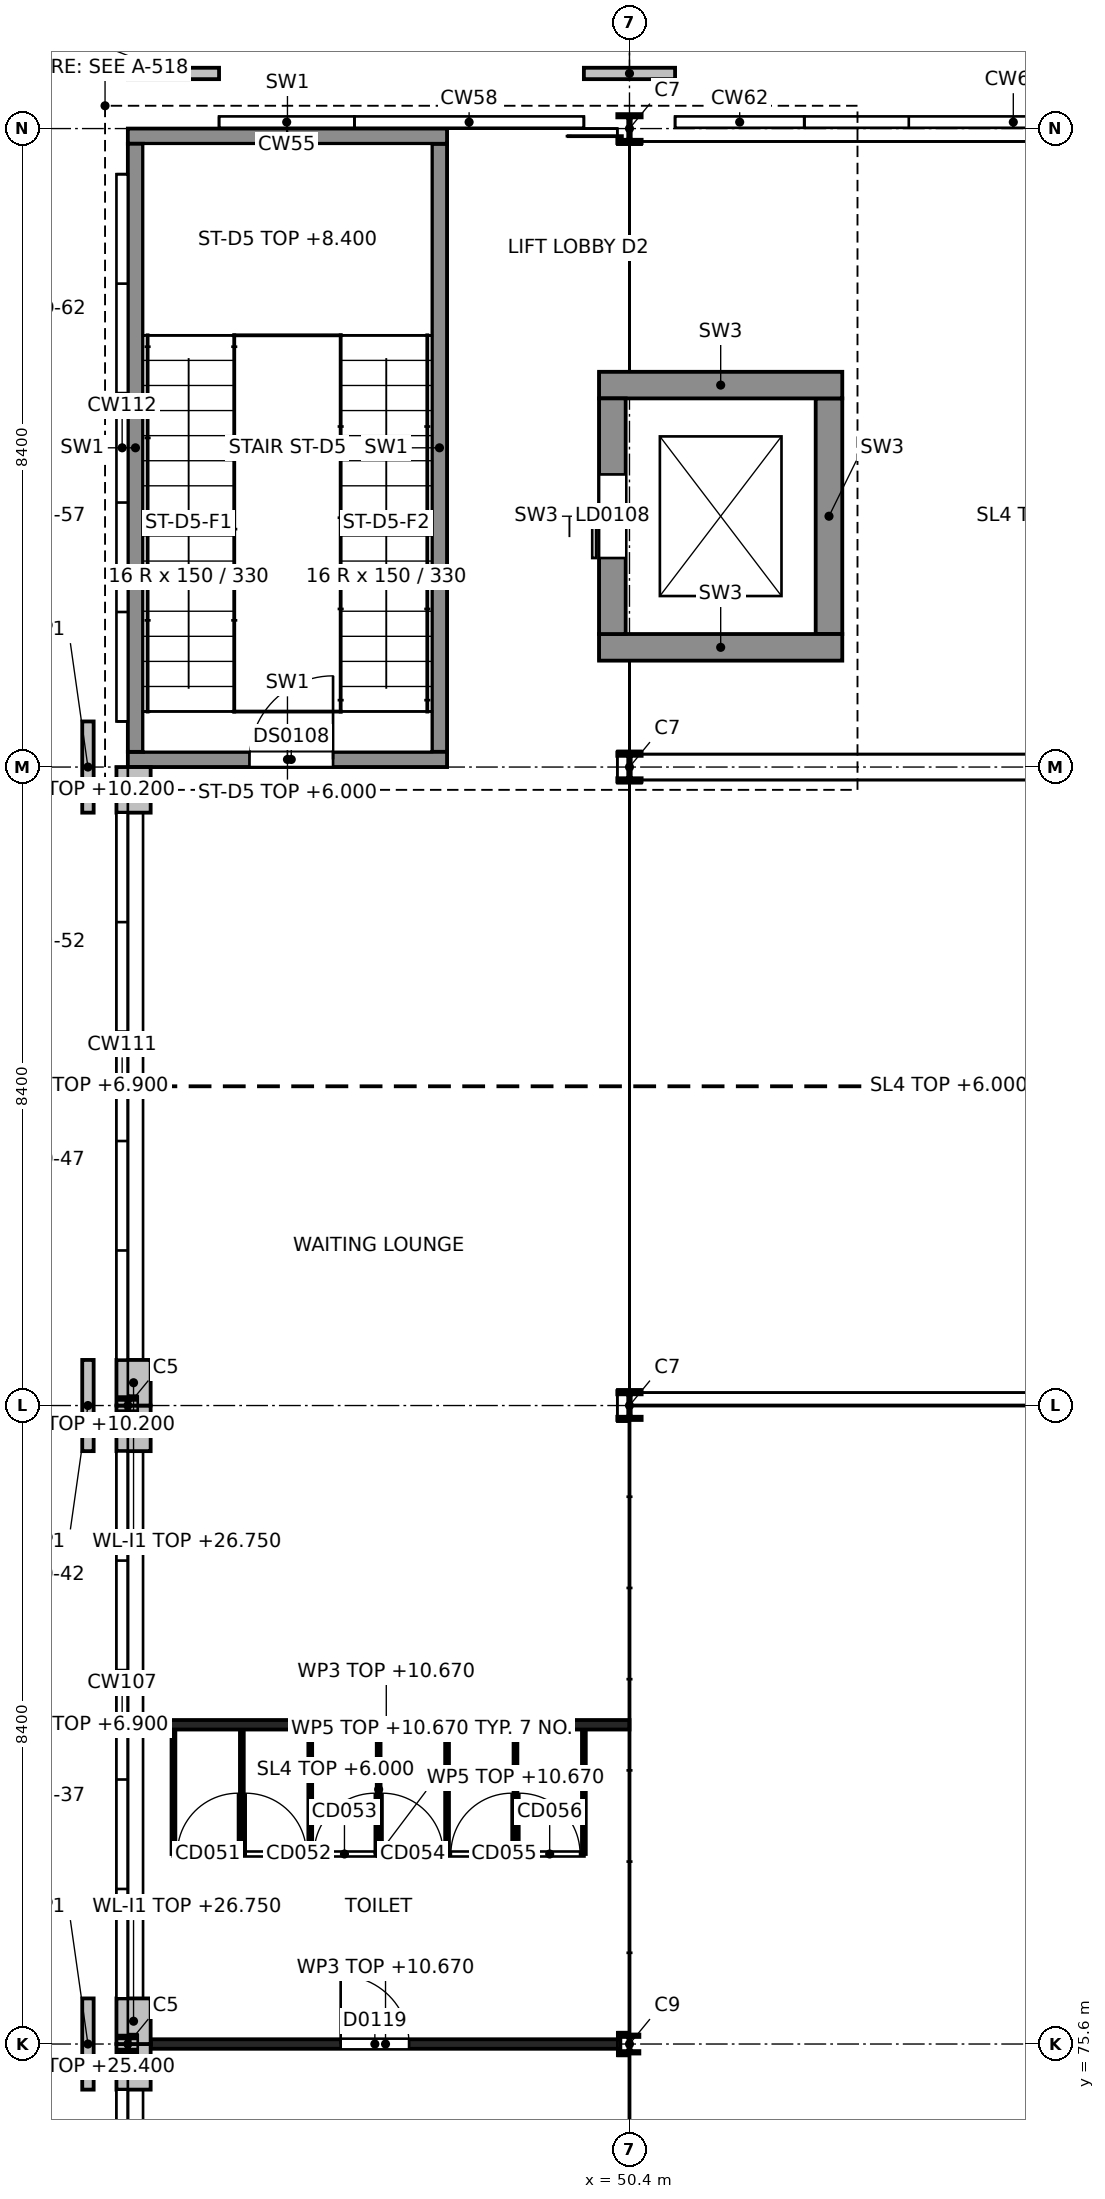
"""IFC4 building model, lengths in metres.
Left out: names, types, materials, properties, quantities, classifications, styles, units other than length and angle.
Written with IfcOpenShell. Run it as: python <this file> out.ifc"""

import sys

from ifc_helpers import new_model, si_unit, direction, frame, frame_2d, origin, origin_2d, place, context, subcontext, project, spatial, rectangle, i_section, extrude, element, fill, save


model = new_model("IFC4")
c1 = context("Model", 3, precision=1e-05, world=origin(), true_north=direction((0.0, 1.0)))
c2 = subcontext(c1, "Body", "Model", "MODEL_VIEW")
j1 = project(units=[si_unit("LENGTHUNIT", "METRE"), si_unit("PLANEANGLEUNIT", "RADIAN")], contexts=[c1])
p1 = place(None, origin())
s1 = spatial("IfcSite", under=j1, at=p1, CompositionType="ELEMENT")
p2 = place(p1, origin())
s2 = spatial("IfcBuilding", under=s1, at=p2, CompositionType="ELEMENT")
p3 = place(p2, frame((0.0, 0.0, 6.0)))
s3 = spatial("IfcBuildingStorey", under=s2, at=p3, CompositionType="ELEMENT", Elevation=6.0)
for number, where, z_axis, x_axis in (
    (1, (43.8, 75.6, 0.0), (0.0, 0.0, 1.0), (1.0, 0.0, 0.0)),
    (2, (43.8, 84.0, 0.0), (0.0, 0.0, 1.0), (1.0, 0.0, 0.0)),
):
    element("IfcColumn", number, at=place(p3, frame(where, z_axis=z_axis, x_axis=x_axis)), inside=s3, PredefinedType="COLUMN", context=c2, shape_type="SweptSolid", body=[
        extrude(i_section(OverallWidth=0.2, OverallDepth=0.2, WebThickness=0.009, FlangeThickness=0.015, at=origin_2d()), origin(), (0.0, 0.0, 1.0), 4.8),
    ])
p4 = place(p3, frame((50.4, 75.6, 0.0), z_axis=(0.0, 0.0, 1.0), x_axis=(1.0, 0.0, 0.0)))
e3 = element("IfcColumn", 3, at=p4, inside=s3, PredefinedType="COLUMN", context=c2, shape_type="SweptSolid", body=[
    extrude(i_section(OverallWidth=0.24, OverallDepth=0.23, WebThickness=0.008, FlangeThickness=0.012, at=origin_2d()), origin(), (0.0, 0.0, 1.0), 4.8),
])
for number, where, z_axis, x_axis in (
    (4, (50.4, 84.0, 0.0), (0.0, 0.0, 1.0), (1.0, 0.0, 0.0)),
    (5, (50.4, 92.4, 0.0), (0.0, 0.0, 1.0), (1.0, 0.0, 0.0)),
    (6, (50.4, 100.8, 0.0), (0.0, 0.0, 1.0), (1.0, 0.0, 0.0)),
):
    element("IfcColumn", number, at=place(p3, frame(where, z_axis=z_axis, x_axis=x_axis)), inside=s3, PredefinedType="COLUMN", context=c2, shape_type="SweptSolid", body=[
        extrude(i_section(OverallWidth=0.3, OverallDepth=0.36, WebThickness=0.012, FlangeThickness=0.022, at=origin_2d()), origin(), (0.0, 0.0, 1.0), 4.8),
    ])
p5 = place(p3, frame((43.8, 92.5, 0.0), z_axis=(0.0, 0.0, 1.0), x_axis=(1.0, 0.0, 0.0)))
e7 = element("IfcWall", 7, at=p5, inside=s3, PredefinedType="SHEAR", context=c2, shape_type="SweptSolid", body=[
    extrude(rectangle(XDim=4.2, YDim=0.2, at=frame_2d((2.1, 0.0))), origin(), (0.0, 0.0, 1.0), 4.8),
])
p6 = place(p5, frame((1.6, 0.0, 0.0)))
e8 = element("IfcOpeningElement", 8, at=p6, cuts=e7, PredefinedType="OPENING", context=c2, shape_type="SweptSolid", body=[
    extrude(rectangle(XDim=1.1, YDim=2.1, at=frame_2d((0.55, 1.05))), frame((0.0, 0.1, 0.0), z_axis=(0.0, -1.0, 0.0), x_axis=(1.0, 0.0, 0.0)), (0.0, 0.0, 1.0), 0.2),
])
p7 = place(p3, frame((43.8, 100.7, 0.0), z_axis=(0.0, 0.0, 1.0), x_axis=(1.0, 0.0, 0.0)))
e9 = element("IfcWall", 9, at=p7, inside=s3, PredefinedType="SHEAR", context=c2, shape_type="SweptSolid", body=[
    extrude(rectangle(XDim=4.2, YDim=0.2, at=frame_2d((2.1, 0.0))), origin(), (0.0, 0.0, 1.0), 4.8),
])
for number, where, z_axis, x_axis in (
    (10, (43.9, 92.6, 0.0), (0.0, 0.0, 1.0), (0.0, 1.0, 0.0)),
    (11, (47.9, 92.6, 0.0), (0.0, 0.0, 1.0), (0.0, 1.0, 0.0)),
):
    element("IfcWall", number, at=place(p3, frame(where, z_axis=z_axis, x_axis=x_axis)), inside=s3, PredefinedType="SHEAR", context=c2, shape_type="SweptSolid", body=[
        extrude(rectangle(XDim=8.0, YDim=0.2, at=frame_2d((4.0, 0.0))), origin(), (0.0, 0.0, 1.0), 4.8),
    ])
for number, where, z_axis, x_axis in (
    (12, (50.0, 93.975, 0.0), (0.0, 0.0, 1.0), (1.0, 0.0, 0.0)),
    (13, (50.0, 97.425, 0.0), (0.0, 0.0, 1.0), (1.0, 0.0, 0.0)),
):
    element("IfcWall", number, at=place(p3, frame(where, z_axis=z_axis, x_axis=x_axis)), inside=s3, PredefinedType="SHEAR", context=c2, shape_type="SweptSolid", body=[
        extrude(rectangle(XDim=3.2, YDim=0.35, at=frame_2d((1.6, 0.0))), origin(), (0.0, 0.0, 1.0), 4.8),
    ])
p8 = place(p3, frame((50.175, 94.15, 0.0), z_axis=(0.0, 0.0, 1.0), x_axis=(0.0, 1.0, 0.0)))
e14 = element("IfcWall", 14, at=p8, inside=s3, PredefinedType="SHEAR", context=c2, shape_type="SweptSolid", body=[
    extrude(rectangle(XDim=3.1, YDim=0.35, at=frame_2d((1.55, 0.0))), origin(), (0.0, 0.0, 1.0), 4.8),
])
p9 = place(p8, frame((1.0, 0.0, 0.0)))
e15 = element("IfcOpeningElement", 15, at=p9, cuts=e14, PredefinedType="OPENING", context=c2, shape_type="SweptSolid", body=[
    extrude(rectangle(XDim=1.1, YDim=2.1, at=frame_2d((0.55, 1.05))), frame((0.0, 0.175, 0.0), z_axis=(0.0, -1.0, 0.0), x_axis=(1.0, 0.0, 0.0)), (0.0, 0.0, 1.0), 0.35),
])
p10 = place(p3, frame((53.025, 94.15, 0.0), z_axis=(0.0, 0.0, 1.0), x_axis=(0.0, 1.0, 0.0)))
e16 = element("IfcWall", 16, at=p10, inside=s3, PredefinedType="SHEAR", context=c2, shape_type="SweptSolid", body=[
    extrude(rectangle(XDim=3.1, YDim=0.35, at=frame_2d((1.55, 0.0))), origin(), (0.0, 0.0, 1.0), 4.8),
])
p11 = place(p3, frame((43.825, 67.8, 0.0), z_axis=(0.0, 0.0, 1.0), x_axis=(0.0, 1.0, 0.0)))
e17 = element("IfcWall", 17, at=p11, inside=s3, PredefinedType="SOLIDWALL", context=c2, shape_type="SweptSolid", body=[
    extrude(rectangle(XDim=7.2, YDim=0.35, at=frame_2d((3.6, 0.0))), origin(), (0.0, 0.0, 1.0), 0.9),
])
p12 = place(p3, frame((43.875, 75.0, 0.0), z_axis=(0.0, 0.0, 1.0), x_axis=(0.0, 1.0, 0.0)))
e18 = element("IfcWall", 18, at=p12, inside=s3, PredefinedType="SOLIDWALL", context=c2, shape_type="SweptSolid", body=[
    extrude(rectangle(XDim=0.6, YDim=0.45, at=frame_2d((0.3, 0.0))), origin(), (0.0, 0.0, 1.0), 19.4),
])
p13 = place(p3, frame((43.825, 76.2, 0.0), z_axis=(0.0, 0.0, 1.0), x_axis=(0.0, 1.0, 0.0)))
e19 = element("IfcWall", 19, at=p13, inside=s3, PredefinedType="SOLIDWALL", context=c2, shape_type="SweptSolid", body=[
    extrude(rectangle(XDim=7.2, YDim=0.35, at=frame_2d((3.6, 0.0))), origin(), (0.0, 0.0, 1.0), 0.9),
])
p14 = place(p3, frame((43.875, 75.6, 0.0), z_axis=(0.0, 0.0, 1.0), x_axis=(0.0, 1.0, 0.0)))
e20 = element("IfcWall", 20, at=p14, inside=s3, PredefinedType="SOLIDWALL", context=c2, shape_type="SweptSolid", body=[
    extrude(rectangle(XDim=0.6, YDim=0.45, at=frame_2d((0.3, 0.0))), origin(), (0.0, 0.0, 1.0), 20.75),
])
p15 = place(p3, frame((43.875, 83.4, 0.0), z_axis=(0.0, 0.0, 1.0), x_axis=(0.0, 1.0, 0.0)))
e21 = element("IfcWall", 21, at=p15, inside=s3, PredefinedType="SOLIDWALL", context=c2, shape_type="SweptSolid", body=[
    extrude(rectangle(XDim=0.6, YDim=0.45, at=frame_2d((0.3, 0.0))), origin(), (0.0, 0.0, 1.0), 20.75),
])
p16 = place(p3, frame((43.825, 84.6, 0.0), z_axis=(0.0, 0.0, 1.0), x_axis=(0.0, 1.0, 0.0)))
e22 = element("IfcWall", 22, at=p16, inside=s3, PredefinedType="SOLIDWALL", context=c2, shape_type="SweptSolid", body=[
    extrude(rectangle(XDim=7.2, YDim=0.35, at=frame_2d((3.6, 0.0))), origin(), (0.0, 0.0, 1.0), 0.9),
])
p17 = place(p3, frame((43.875, 84.0, 0.0), z_axis=(0.0, 0.0, 1.0), x_axis=(0.0, 1.0, 0.0)))
e23 = element("IfcWall", 23, at=p17, inside=s3, PredefinedType="SOLIDWALL", context=c2, shape_type="SweptSolid", body=[
    extrude(rectangle(XDim=0.6, YDim=0.45, at=frame_2d((0.3, 0.0))), origin(), (0.0, 0.0, 1.0), 4.2),
])
p18 = place(p3, frame((43.875, 91.8, 0.0), z_axis=(0.0, 0.0, 1.0), x_axis=(0.0, 1.0, 0.0)))
e24 = element("IfcWall", 24, at=p18, inside=s3, PredefinedType="SOLIDWALL", context=c2, shape_type="SweptSolid", body=[
    extrude(rectangle(XDim=0.6, YDim=0.45, at=frame_2d((0.3, 0.0))), origin(), (0.0, 0.0, 1.0), 4.2),
])
p19 = place(p3, frame((43.275, 75.0, 0.0), z_axis=(0.0, 0.0, 1.0), x_axis=(0.0, 1.0, 0.0)))
e25 = element("IfcWall", 25, at=p19, inside=s3, PredefinedType="SOLIDWALL", context=c2, shape_type="SweptSolid", body=[
    extrude(rectangle(XDim=1.2, YDim=0.15, at=frame_2d((0.6, 0.0))), origin(), (0.0, 0.0, 1.0), 4.8),
])
p20 = place(p3, frame((43.275, 83.4, 0.0), z_axis=(0.0, 0.0, 1.0), x_axis=(0.0, 1.0, 0.0)))
e26 = element("IfcWall", 26, at=p20, inside=s3, PredefinedType="SOLIDWALL", context=c2, shape_type="SweptSolid", body=[
    extrude(rectangle(XDim=1.2, YDim=0.15, at=frame_2d((0.6, 0.0))), origin(), (0.0, 0.0, 1.0), 4.8),
])
for number, where, z_axis, x_axis in (
    (27, (43.275, 91.8, 0.0), (0.0, 0.0, 1.0), (0.0, 1.0, 0.0)),
    (28, (43.8, 101.525, 0.0), (0.0, 0.0, 1.0), (1.0, 0.0, 0.0)),
    (29, (49.8, 101.525, 0.0), (0.0, 0.0, 1.0), (1.0, 0.0, 0.0)),
):
    element("IfcWall", number, at=place(p3, frame(where, z_axis=z_axis, x_axis=x_axis)), inside=s3, PredefinedType="SOLIDWALL", context=c2, shape_type="SweptSolid", body=[
        extrude(rectangle(XDim=1.2, YDim=0.15, at=frame_2d((0.6, 0.0))), origin(), (0.0, 0.0, 1.0), 4.8),
    ])
p21 = place(p3, frame((44.101, 75.6, 0.0), z_axis=(0.0, 0.0, 1.0), x_axis=(1.0, 0.0, 0.0)))
e30 = element("IfcWall", 30, at=p21, inside=s3, PredefinedType="PARTITIONING", context=c2, shape_type="SweptSolid", body=[
    extrude(rectangle(XDim=6.179, YDim=0.125, at=frame_2d((3.09, 0.0))), origin(), (0.0, 0.0, 1.0), 4.67),
])
p22 = place(p21, frame((2.5, 0.0, 0.0)))
e31 = element("IfcOpeningElement", 31, at=p22, cuts=e30, PredefinedType="OPENING", context=c2, shape_type="SweptSolid", body=[
    extrude(rectangle(XDim=0.9, YDim=2.1, at=frame_2d((0.45, 1.05))), frame((0.0, 0.062, 0.0), z_axis=(0.0, -1.0, 0.0), x_axis=(1.0, 0.0, 0.0)), (0.0, 0.0, 1.0), 0.125),
])
p23 = place(p3, frame((44.0, 79.8, 0.0), z_axis=(0.0, 0.0, 1.0), x_axis=(1.0, 0.0, 0.0)))
e32 = element("IfcWall", 32, at=p23, inside=s3, PredefinedType="PARTITIONING", context=c2, shape_type="SweptSolid", body=[
    extrude(rectangle(XDim=6.399, YDim=0.125, at=frame_2d((3.2, 0.0))), origin(), (0.0, 0.0, 1.0), 4.67),
])
p24 = place(p3, frame((44.4, 78.1, 0.0), z_axis=(0.0, 0.0, 1.0), x_axis=(1.0, 0.0, 0.0)))
e33 = element("IfcWall", 33, at=p24, inside=s3, PredefinedType="PARTITIONING", context=c2, shape_type="SweptSolid", body=[
    extrude(rectangle(XDim=5.4, YDim=0.05, at=frame_2d((2.7, 0.0))), origin(), (0.0, 0.0, 1.0), 4.67),
])
p25 = place(p24, frame((0.05, 0.0, 0.0)))
e34 = element("IfcOpeningElement", 34, at=p25, cuts=e33, PredefinedType="OPENING", context=c2, shape_type="SweptSolid", body=[
    extrude(rectangle(XDim=0.8, YDim=2.0, at=frame_2d((0.4, 1.0))), frame((0.0, 0.025, 0.0), z_axis=(0.0, -1.0, 0.0), x_axis=(1.0, 0.0, 0.0)), (0.0, 0.0, 1.0), 0.05),
])
p26 = place(p24, frame((0.95, 0.0, 0.0)))
e35 = element("IfcOpeningElement", 35, at=p26, cuts=e33, PredefinedType="OPENING", context=c2, shape_type="SweptSolid", body=[
    extrude(rectangle(XDim=0.8, YDim=2.0, at=frame_2d((0.4, 1.0))), frame((0.0, 0.025, 0.0), z_axis=(0.0, -1.0, 0.0), x_axis=(1.0, 0.0, 0.0)), (0.0, 0.0, 1.0), 0.05),
])
p27 = place(p24, frame((1.85, 0.0, 0.0)))
e36 = element("IfcOpeningElement", 36, at=p27, cuts=e33, PredefinedType="OPENING", context=c2, shape_type="SweptSolid", body=[
    extrude(rectangle(XDim=0.8, YDim=2.0, at=frame_2d((0.4, 1.0))), frame((0.0, 0.025, 0.0), z_axis=(0.0, -1.0, 0.0), x_axis=(1.0, 0.0, 0.0)), (0.0, 0.0, 1.0), 0.05),
])
p28 = place(p24, frame((2.75, 0.0, 0.0)))
e37 = element("IfcOpeningElement", 37, at=p28, cuts=e33, PredefinedType="OPENING", context=c2, shape_type="SweptSolid", body=[
    extrude(rectangle(XDim=0.8, YDim=2.0, at=frame_2d((0.4, 1.0))), frame((0.0, 0.025, 0.0), z_axis=(0.0, -1.0, 0.0), x_axis=(1.0, 0.0, 0.0)), (0.0, 0.0, 1.0), 0.05),
])
p29 = place(p24, frame((3.65, 0.0, 0.0)))
e38 = element("IfcOpeningElement", 38, at=p29, cuts=e33, PredefinedType="OPENING", context=c2, shape_type="SweptSolid", body=[
    extrude(rectangle(XDim=0.8, YDim=2.0, at=frame_2d((0.4, 1.0))), frame((0.0, 0.025, 0.0), z_axis=(0.0, -1.0, 0.0), x_axis=(1.0, 0.0, 0.0)), (0.0, 0.0, 1.0), 0.05),
])
p30 = place(p24, frame((4.55, 0.0, 0.0)))
e39 = element("IfcOpeningElement", 39, at=p30, cuts=e33, PredefinedType="OPENING", context=c2, shape_type="SweptSolid", body=[
    extrude(rectangle(XDim=0.8, YDim=2.0, at=frame_2d((0.4, 1.0))), frame((0.0, 0.025, 0.0), z_axis=(0.0, -1.0, 0.0), x_axis=(1.0, 0.0, 0.0)), (0.0, 0.0, 1.0), 0.05),
])
for number, where, z_axis, x_axis in (
    (40, (44.4, 79.8, 0.0), (0.0, 0.0, 1.0), (0.0, -1.0, 0.0)),
    (41, (45.3, 79.8, 0.0), (0.0, 0.0, 1.0), (0.0, -1.0, 0.0)),
    (42, (46.2, 79.8, 0.0), (0.0, 0.0, 1.0), (0.0, -1.0, 0.0)),
    (43, (47.1, 79.8, 0.0), (0.0, 0.0, 1.0), (0.0, -1.0, 0.0)),
    (44, (48.0, 79.8, 0.0), (0.0, 0.0, 1.0), (0.0, -1.0, 0.0)),
    (45, (48.9, 79.8, 0.0), (0.0, 0.0, 1.0), (0.0, -1.0, 0.0)),
    (46, (49.8, 79.8, 0.0), (0.0, 0.0, 1.0), (0.0, -1.0, 0.0)),
):
    element("IfcWall", number, at=place(p3, frame(where, z_axis=z_axis, x_axis=x_axis)), inside=s3, PredefinedType="PARTITIONING", context=c2, shape_type="SweptSolid", body=[
        extrude(rectangle(XDim=1.7, YDim=0.05, at=frame_2d((0.85, 0.0))), origin(), (0.0, 0.0, 1.0), 4.67),
    ])
p31 = place(p22, origin())
e47 = element("IfcDoor", 47, at=p31, inside=s3, OperationType="SINGLE_SWING_LEFT", PredefinedType="DOOR", context=c2, shape_type="SweptSolid", body=[
    extrude(rectangle(XDim=0.9, YDim=2.1, at=frame_2d((0.45, 1.05))), frame((0.0, 0.025, 0.0), z_axis=(0.0, -1.0, 0.0), x_axis=(1.0, 0.0, 0.0)), (0.0, 0.0, 1.0), 0.05),
])
fill(e31, e47)
p32 = place(p6, origin())
e48 = element("IfcDoor", 48, at=p32, inside=s3, OperationType="SINGLE_SWING_RIGHT", PredefinedType="DOOR", context=c2, shape_type="SweptSolid", body=[
    extrude(rectangle(XDim=1.1, YDim=2.1, at=frame_2d((0.55, 1.05))), frame((0.0, 0.025, 0.0), z_axis=(0.0, -1.0, 0.0), x_axis=(1.0, 0.0, 0.0)), (0.0, 0.0, 1.0), 0.05),
])
fill(e8, e48)
p33 = place(p9, origin())
e49 = element("IfcDoor", 49, at=p33, inside=s3, OperationType="SLIDING_TO_RIGHT", PredefinedType="DOOR", context=c2, shape_type="SweptSolid", body=[
    extrude(rectangle(XDim=1.1, YDim=2.1, at=frame_2d((0.55, 1.05))), frame((0.0, 0.025, 0.0), z_axis=(0.0, -1.0, 0.0), x_axis=(1.0, 0.0, 0.0)), (0.0, 0.0, 1.0), 0.05),
])
fill(e15, e49)
p34 = place(p25, origin())
e50 = element("IfcDoor", 50, at=p34, inside=s3, OperationType="SINGLE_SWING_RIGHT", PredefinedType="DOOR", context=c2, shape_type="SweptSolid", body=[
    extrude(rectangle(XDim=0.8, YDim=2.0, at=frame_2d((0.4, 1.0))), frame((0.0, 0.025, 0.0), z_axis=(0.0, -1.0, 0.0), x_axis=(1.0, 0.0, 0.0)), (0.0, 0.0, 1.0), 0.05),
])
fill(e34, e50)
p35 = place(p26, origin())
e51 = element("IfcDoor", 51, at=p35, inside=s3, OperationType="SINGLE_SWING_LEFT", PredefinedType="DOOR", context=c2, shape_type="SweptSolid", body=[
    extrude(rectangle(XDim=0.8, YDim=2.0, at=frame_2d((0.4, 1.0))), frame((0.0, 0.025, 0.0), z_axis=(0.0, -1.0, 0.0), x_axis=(1.0, 0.0, 0.0)), (0.0, 0.0, 1.0), 0.05),
])
fill(e35, e51)
p36 = place(p27, origin())
e52 = element("IfcDoor", 52, at=p36, inside=s3, OperationType="SINGLE_SWING_RIGHT", PredefinedType="DOOR", context=c2, shape_type="SweptSolid", body=[
    extrude(rectangle(XDim=0.8, YDim=2.0, at=frame_2d((0.4, 1.0))), frame((0.0, 0.025, 0.0), z_axis=(0.0, -1.0, 0.0), x_axis=(1.0, 0.0, 0.0)), (0.0, 0.0, 1.0), 0.05),
])
fill(e36, e52)
p37 = place(p28, origin())
e53 = element("IfcDoor", 53, at=p37, inside=s3, OperationType="SINGLE_SWING_LEFT", PredefinedType="DOOR", context=c2, shape_type="SweptSolid", body=[
    extrude(rectangle(XDim=0.8, YDim=2.0, at=frame_2d((0.4, 1.0))), frame((0.0, 0.025, 0.0), z_axis=(0.0, -1.0, 0.0), x_axis=(1.0, 0.0, 0.0)), (0.0, 0.0, 1.0), 0.05),
])
fill(e37, e53)
p38 = place(p29, origin())
e54 = element("IfcDoor", 54, at=p38, inside=s3, OperationType="SINGLE_SWING_RIGHT", PredefinedType="DOOR", context=c2, shape_type="SweptSolid", body=[
    extrude(rectangle(XDim=0.8, YDim=2.0, at=frame_2d((0.4, 1.0))), frame((0.0, 0.025, 0.0), z_axis=(0.0, -1.0, 0.0), x_axis=(1.0, 0.0, 0.0)), (0.0, 0.0, 1.0), 0.05),
])
fill(e38, e54)
p39 = place(p30, origin())
e55 = element("IfcDoor", 55, at=p39, inside=s3, OperationType="SINGLE_SWING_LEFT", PredefinedType="DOOR", context=c2, shape_type="SweptSolid", body=[
    extrude(rectangle(XDim=0.8, YDim=2.0, at=frame_2d((0.4, 1.0))), frame((0.0, 0.025, 0.0), z_axis=(0.0, -1.0, 0.0), x_axis=(1.0, 0.0, 0.0)), (0.0, 0.0, 1.0), 0.05),
])
fill(e39, e55)
save(model, sys.argv[1])
